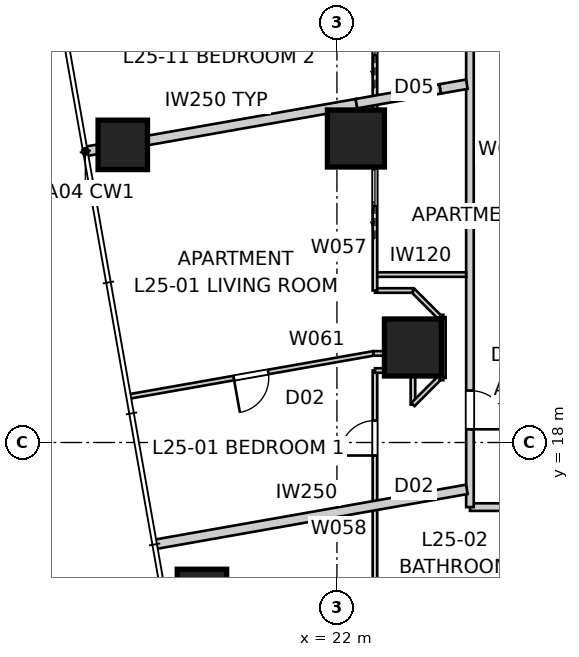
"""IFC4 building model, lengths in metres.
Left out: names, types, materials, properties, quantities, classifications, styles, units other than length and angle.
Written with IfcOpenShell. Run it as: python <this file> out.ifc"""

import sys

from ifc_helpers import new_model, si_unit, direction, frame, frame_2d, origin, origin_2d, place, context, subcontext, project, spatial, rectangle, extrude, element, fill, save


model = new_model("IFC4")
c1 = context("Model", 3, precision=1e-05, world=origin(), true_north=direction((0.0, 1.0)))
c2 = subcontext(c1, "Body", "Model", "MODEL_VIEW")
j1 = project(units=[si_unit("LENGTHUNIT", "METRE"), si_unit("PLANEANGLEUNIT", "RADIAN")], contexts=[c1])
p1 = place(None, origin())
s1 = spatial("IfcSite", under=j1, at=p1, CompositionType="ELEMENT")
p2 = place(p1, origin())
s2 = spatial("IfcBuilding", under=s1, at=p2, CompositionType="ELEMENT")
p3 = place(p2, frame((0.0, 0.0, 93.0)))
s3 = spatial("IfcBuildingStorey", under=s2, at=p3, CompositionType="ELEMENT", Elevation=93.0)
for number, where, z_axis, x_axis in (
    (1, (16.365, 25.833, 0.0), (0.0, 0.0, 1.0), (1.0, 0.0, 0.0)),
    (2, (18.448, 14.015, 0.0), (0.0, 0.0, 1.0), (1.0, 0.0, 0.0)),
):
    element("IfcColumn", number, at=place(p3, frame(where, z_axis=z_axis, x_axis=x_axis)), inside=s3, PredefinedType="COLUMN", context=c2, shape_type="SweptSolid", body=[
        extrude(rectangle(XDim=1.3, YDim=1.3, at=origin_2d()), origin(), (0.0, 0.0, 1.0), 3.4),
    ])
for number, where, z_axis, x_axis in (
    (3, (22.5, 26.0, 0.0), (0.0, 0.0, 1.0), (1.0, 0.0, 0.0)),
    (4, (24.0, 20.5, 0.0), (0.0, 0.0, 1.0), (1.0, 0.0, 0.0)),
):
    element("IfcColumn", number, at=place(p3, frame(where, z_axis=z_axis, x_axis=x_axis)), inside=s3, PredefinedType="COLUMN", context=c2, shape_type="SweptSolid", body=[
        extrude(rectangle(XDim=1.5, YDim=1.5, at=origin_2d()), origin(), (0.0, 0.0, 1.0), 3.4),
    ])
p4 = place(p3, frame((25.5, 16.3, 0.0), z_axis=(0.0, 0.0, 1.0), x_axis=(1.0, 0.0, 0.0)))
e5 = element("IfcWall", 5, at=p4, inside=s3, PredefinedType="PARTITIONING", context=c2, shape_type="SweptSolid", body=[
    extrude(rectangle(XDim=29.0, YDim=0.2, at=frame_2d((14.5, 0.0))), origin(), (0.0, 0.0, 1.0), 3.25),
])
p5 = place(p4, frame((20.896, 0.0, 0.0)))
e6 = element("IfcOpeningElement", 6, at=p5, cuts=e5, PredefinedType="OPENING", context=c2, shape_type="SweptSolid", body=[
    extrude(rectangle(XDim=1.02, YDim=2.34, at=frame_2d((0.51, 1.17))), frame((0.0, 0.11, 0.0), z_axis=(0.0, -1.0, 0.0), x_axis=(1.0, 0.0, 0.0)), (0.0, 0.0, 1.0), 0.22),
])
p6 = place(p4, frame((14.257, 0.0, 0.0)))
e7 = element("IfcOpeningElement", 7, at=p6, cuts=e5, PredefinedType="OPENING", context=c2, shape_type="SweptSolid", body=[
    extrude(rectangle(XDim=1.02, YDim=2.34, at=frame_2d((0.51, 1.17))), frame((0.0, 0.11, 0.0), z_axis=(0.0, -1.0, 0.0), x_axis=(1.0, 0.0, 0.0)), (0.0, 0.0, 1.0), 0.22),
])
p7 = place(p4, frame((3.857, 0.0, 0.0)))
e8 = element("IfcOpeningElement", 8, at=p7, cuts=e5, PredefinedType="OPENING", context=c2, shape_type="SweptSolid", body=[
    extrude(rectangle(XDim=1.02, YDim=2.34, at=frame_2d((0.51, 1.17))), frame((0.0, 0.11, 0.0), z_axis=(0.0, -1.0, 0.0), x_axis=(1.0, 0.0, 0.0)), (0.0, 0.0, 1.0), 0.22),
])
p8 = place(p3, frame((25.5, 43.7, 0.0), z_axis=(0.0, 0.0, 1.0), x_axis=(0.0, -1.0, 0.0)))
e9 = element("IfcWall", 9, at=p8, inside=s3, PredefinedType="PARTITIONING", context=c2, shape_type="SweptSolid", body=[
    extrude(rectangle(XDim=27.4, YDim=0.2, at=frame_2d((13.7, 0.0))), origin(), (0.0, 0.0, 1.0), 3.25),
])
p9 = place(p8, frame((24.333, 0.0, 0.0)))
e10 = element("IfcOpeningElement", 10, at=p9, cuts=e9, PredefinedType="OPENING", context=c2, shape_type="SweptSolid", body=[
    extrude(rectangle(XDim=1.02, YDim=2.1, at=frame_2d((0.51, 1.05))), frame((0.0, 0.11, 0.0), z_axis=(0.0, -1.0, 0.0), x_axis=(1.0, 0.0, 0.0)), (0.0, 0.0, 1.0), 0.22),
])
p10 = place(p8, frame((10.631, 0.0, 0.0)))
e11 = element("IfcOpeningElement", 11, at=p10, cuts=e9, PredefinedType="OPENING", context=c2, shape_type="SweptSolid", body=[
    extrude(rectangle(XDim=1.02, YDim=2.34, at=frame_2d((0.51, 1.17))), frame((0.0, 0.11, 0.0), z_axis=(0.0, -1.0, 0.0), x_axis=(1.0, 0.0, 0.0)), (0.0, 0.0, 1.0), 0.22),
])
p11 = place(p8, frame((0.911, 0.0, 0.0)))
e12 = element("IfcOpeningElement", 12, at=p11, cuts=e9, PredefinedType="OPENING", context=c2, shape_type="SweptSolid", body=[
    extrude(rectangle(XDim=1.02, YDim=2.34, at=frame_2d((0.51, 1.17))), frame((0.0, 0.11, 0.0), z_axis=(0.0, -1.0, 0.0), x_axis=(1.0, 0.0, 0.0)), (0.0, 0.0, 1.0), 0.22),
])
p12 = place(p3, frame((15.38, 25.659, 0.0), z_axis=(0.0, 0.0, 1.0), x_axis=(0.984802553948, 0.173677660443, 0.0)))
e13 = element("IfcWall", 13, at=p12, inside=s3, PredefinedType="PARTITIONING", context=c2, shape_type="SweptSolid", body=[
    extrude(rectangle(XDim=7.244, YDim=0.25, at=frame_2d((3.622, 0.0))), origin(), (0.0, 0.0, 1.0), 3.25),
])
p13 = place(p3, frame((22.513, 26.917, 0.0), z_axis=(0.0, 0.0, 1.0), x_axis=(0.984809882944, 0.17363609779, 0.0)))
e14 = element("IfcWall", 14, at=p13, inside=s3, PredefinedType="PARTITIONING", context=c2, shape_type="SweptSolid", body=[
    extrude(rectangle(XDim=2.24, YDim=0.25, at=frame_2d((1.12, 0.0))), origin(), (0.0, 0.0, 1.0), 2.795),
])
p14 = place(p3, frame((24.719, 27.306, 0.0), z_axis=(0.0, 0.0, 1.0), x_axis=(0.984835495461, 0.173490768861, 0.0)))
e15 = element("IfcWall", 15, at=p14, inside=s3, PredefinedType="PARTITIONING", context=c2, shape_type="SweptSolid", body=[
    extrude(rectangle(XDim=0.709, YDim=0.25, at=frame_2d((0.354, 0.0))), origin(), (0.0, 0.0, 1.0), 3.25),
])
p15 = place(p3, frame((17.203, 15.318, 0.0), z_axis=(0.0, 0.0, 1.0), x_axis=(0.984807121942, 0.173651756605, 0.0)))
e16 = element("IfcWall", 16, at=p15, inside=s3, PredefinedType="PARTITIONING", context=c2, shape_type="SweptSolid", body=[
    extrude(rectangle(XDim=8.341, YDim=0.25, at=frame_2d((4.171, 0.0))), origin(), (0.0, 0.0, 1.0), 3.25),
])
p16 = place(p3, frame((23.0, 22.419, 0.0), z_axis=(0.0, 0.0, 1.0), x_axis=(1.0, 0.0, 0.0)))
e17 = element("IfcWall", 17, at=p16, inside=s3, PredefinedType="PARTITIONING", context=c2, shape_type="SweptSolid", body=[
    extrude(rectangle(XDim=2.4, YDim=0.12, at=frame_2d((1.2, 0.0))), origin(), (0.0, 0.0, 1.0), 3.25),
])
p17 = place(p3, frame((24.0, 20.344, 0.0), z_axis=(0.0, 0.0, 1.0), x_axis=(0.0, -1.0, 0.0)))
e18 = element("IfcWall", 18, at=p17, inside=s3, PredefinedType="PARTITIONING", context=c2, shape_type="SweptSolid", body=[
    extrude(rectangle(XDim=1.344, YDim=0.12, at=frame_2d((0.672, 0.0))), origin(), (0.0, 0.0, 1.0), 3.25),
])
p18 = place(p3, frame((24.0, 19.0, 0.0), z_axis=(0.0, 0.0, 1.0), x_axis=(0.707106781187, 0.707106781187, 0.0)))
e19 = element("IfcWall", 19, at=p18, inside=s3, PredefinedType="PARTITIONING", context=c2, shape_type="SweptSolid", body=[
    extrude(rectangle(XDim=0.99, YDim=0.12, at=frame_2d((0.495, 0.0))), origin(), (0.0, 0.0, 1.0), 3.25),
])
p19 = place(p3, frame((24.8, 19.7, 0.0), z_axis=(0.0, 0.0, 1.0), x_axis=(0.0, 1.0, 0.0)))
e20 = element("IfcWall", 20, at=p19, inside=s3, PredefinedType="PARTITIONING", context=c2, shape_type="SweptSolid", body=[
    extrude(rectangle(XDim=1.6, YDim=0.12, at=frame_2d((0.8, 0.0))), origin(), (0.0, 0.0, 1.0), 3.25),
])
p20 = place(p3, frame((24.7, 21.3, 0.0), z_axis=(0.0, 0.0, 1.0), x_axis=(-0.707106781187, 0.707106781187, 0.0)))
e21 = element("IfcWall", 21, at=p20, inside=s3, PredefinedType="PARTITIONING", context=c2, shape_type="SweptSolid", body=[
    extrude(rectangle(XDim=0.99, YDim=0.12, at=frame_2d((0.495, 0.0))), origin(), (0.0, 0.0, 1.0), 3.25),
])
p21 = place(p3, frame((24.0, 22.0, 0.0), z_axis=(0.0, 0.0, 1.0), x_axis=(-1.0, 0.0, 0.0)))
e22 = element("IfcWall", 22, at=p21, inside=s3, PredefinedType="PARTITIONING", context=c2, shape_type="SweptSolid", body=[
    extrude(rectangle(XDim=1.0, YDim=0.12, at=frame_2d((0.5, 0.0))), origin(), (0.0, 0.0, 1.0), 2.722),
])
p22 = place(p3, frame((23.0, 22.0, 0.0), z_axis=(0.0, 0.0, 1.0), x_axis=(0.0, 1.0, 0.0)))
e23 = element("IfcWall", 23, at=p22, inside=s3, PredefinedType="PARTITIONING", context=c2, shape_type="SweptSolid", body=[
    extrude(rectangle(XDim=15.664, YDim=0.12, at=frame_2d((7.832, 0.0))), origin(), (0.0, 0.0, 1.0), 2.55),
])
p23 = place(p22, frame((9.874, 0.0, 0.0)))
e24 = element("IfcOpeningElement", 24, at=p23, cuts=e23, PredefinedType="OPENING", context=c2, shape_type="SweptSolid", body=[
    extrude(rectangle(XDim=0.92, YDim=2.34, at=frame_2d((0.46, 1.17))), frame((0.0, 0.07, 0.0), z_axis=(0.0, -1.0, 0.0), x_axis=(1.0, 0.0, 0.0)), (0.0, 0.0, 1.0), 0.14),
])
p24 = place(p22, frame((13.734, 0.0, 0.0)))
e25 = element("IfcOpeningElement", 25, at=p24, cuts=e23, PredefinedType="OPENING", context=c2, shape_type="SweptSolid", body=[
    extrude(rectangle(XDim=0.96, YDim=2.1, at=frame_2d((0.48, 1.05))), frame((0.0, 0.07, 0.0), z_axis=(0.0, -1.0, 0.0), x_axis=(1.0, 0.0, 0.0)), (0.0, 0.0, 1.0), 0.14),
])
p25 = place(p22, frame((6.198, 0.0, 0.0)))
e26 = element("IfcOpeningElement", 26, at=p25, cuts=e23, PredefinedType="OPENING", context=c2, shape_type="SweptSolid", body=[
    extrude(rectangle(XDim=0.96, YDim=2.1, at=frame_2d((0.48, 1.05))), frame((0.0, 0.07, 0.0), z_axis=(0.0, -1.0, 0.0), x_axis=(1.0, 0.0, 0.0)), (0.0, 0.0, 1.0), 0.14),
])
p26 = place(p22, frame((2.231, 0.0, 0.0)))
e27 = element("IfcOpeningElement", 27, at=p26, cuts=e23, PredefinedType="OPENING", context=c2, shape_type="SweptSolid", body=[
    extrude(rectangle(XDim=0.96, YDim=2.1, at=frame_2d((0.48, 1.05))), frame((0.0, 0.07, 0.0), z_axis=(0.0, -1.0, 0.0), x_axis=(1.0, 0.0, 0.0)), (0.0, 0.0, 1.0), 0.14),
])
p27 = place(p3, frame((23.0, 13.8, 0.0), z_axis=(0.0, 0.0, 1.0), x_axis=(0.0, 1.0, 0.0)))
e28 = element("IfcWall", 28, at=p27, inside=s3, PredefinedType="PARTITIONING", context=c2, shape_type="SweptSolid", body=[
    extrude(rectangle(XDim=6.094, YDim=0.12, at=frame_2d((3.047, 0.0))), origin(), (0.0, 0.0, 1.0), 3.25),
])
p28 = place(p27, frame((3.857, 0.0, 0.0)))
e29 = element("IfcOpeningElement", 29, at=p28, cuts=e28, PredefinedType="OPENING", context=c2, shape_type="SweptSolid", body=[
    extrude(rectangle(XDim=0.92, YDim=2.34, at=frame_2d((0.46, 1.17))), frame((0.0, 0.07, 0.0), z_axis=(0.0, -1.0, 0.0), x_axis=(1.0, 0.0, 0.0)), (0.0, 0.0, 1.0), 0.14),
])
p29 = place(p3, frame((23.0, 19.894, 0.0), z_axis=(0.0, 0.0, 1.0), x_axis=(1.0, 0.0, 0.0)))
e30 = element("IfcWall", 30, at=p29, inside=s3, PredefinedType="PARTITIONING", context=c2, shape_type="SweptSolid", body=[
    extrude(rectangle(XDim=1.0, YDim=0.12, at=frame_2d((0.5, 0.0))), origin(), (0.0, 0.0, 1.0), 3.25),
])
p30 = place(p3, frame((24.0, 20.344, 0.0), z_axis=(0.0, 0.0, 1.0), x_axis=(-1.0, 0.0, 0.0)))
e31 = element("IfcWall", 31, at=p30, inside=s3, PredefinedType="PARTITIONING", context=c2, shape_type="SweptSolid", body=[
    extrude(rectangle(XDim=1.039, YDim=0.12, at=frame_2d((0.52, 0.0))), origin(), (0.0, 0.0, 1.0), 3.25),
])
p31 = place(p3, frame((22.961, 20.344, 0.0), z_axis=(0.0, 0.0, 1.0), x_axis=(-0.984809249117, -0.173639692622, 0.0)))
e32 = element("IfcWall", 32, at=p31, inside=s3, PredefinedType="PARTITIONING", context=c2, shape_type="SweptSolid", body=[
    extrude(rectangle(XDim=6.503, YDim=0.12, at=frame_2d((3.251, 0.0))), origin(), (0.0, 0.0, 1.0), 3.25),
])
p32 = place(p31, frame((2.811, 0.0, 0.0)))
e33 = element("IfcOpeningElement", 33, at=p32, cuts=e32, PredefinedType="OPENING", context=c2, shape_type="SweptSolid", body=[
    extrude(rectangle(XDim=0.92, YDim=2.34, at=frame_2d((0.46, 1.17))), frame((0.0, 0.07, 0.0), z_axis=(0.0, -1.0, 0.0), x_axis=(1.0, 0.0, 0.0)), (0.0, 0.0, 1.0), 0.14),
])
for number, where, z_axis, x_axis in (
    (34, (24.8, 19.7, 0.0), (0.0, 0.0, 1.0), (-1.0, 0.0, 0.0)),
    (35, (24.8, 21.3, 0.0), (0.0, 0.0, 1.0), (-1.0, 0.0, 0.0)),
):
    element("IfcWall", number, at=place(p3, frame(where, z_axis=z_axis, x_axis=x_axis)), inside=s3, PredefinedType="PARTITIONING", context=c2, shape_type="SweptSolid", body=[
        extrude(rectangle(XDim=0.1, YDim=0.12, at=frame_2d((0.05, 0.0))), origin(), (0.0, 0.0, 1.0), 3.25),
    ])
p33 = place(p9, origin())
e36 = element("IfcDoor", 36, at=p33, inside=s3, OperationType="SINGLE_SWING_RIGHT", PredefinedType="DOOR", context=c2, shape_type="SweptSolid", body=[
    extrude(rectangle(XDim=1.02, YDim=2.1, at=frame_2d((0.51, 1.05))), frame((0.0, 0.025, 0.0), z_axis=(0.0, -1.0, 0.0), x_axis=(1.0, 0.0, 0.0)), (0.0, 0.0, 1.0), 0.05),
])
fill(e10, e36)
p34 = place(p28, origin())
e37 = element("IfcDoor", 37, at=p34, inside=s3, OperationType="SINGLE_SWING_LEFT", PredefinedType="DOOR", context=c2, shape_type="SweptSolid", body=[
    extrude(rectangle(XDim=0.92, YDim=2.34, at=frame_2d((0.46, 1.17))), frame((0.0, 0.025, 0.0), z_axis=(0.0, -1.0, 0.0), x_axis=(1.0, 0.0, 0.0)), (0.0, 0.0, 1.0), 0.05),
])
fill(e29, e37)
p35 = place(p25, origin())
e38 = element("IfcDoor", 38, at=p35, inside=s3, OperationType="SLIDING_TO_LEFT", PredefinedType="DOOR", context=c2, shape_type="SweptSolid", body=[
    extrude(rectangle(XDim=0.96, YDim=2.1, at=frame_2d((0.48, 1.05))), frame((0.0, 0.025, 0.0), z_axis=(0.0, -1.0, 0.0), x_axis=(1.0, 0.0, 0.0)), (0.0, 0.0, 1.0), 0.05),
])
fill(e26, e38)
p36 = place(p32, origin())
e39 = element("IfcDoor", 39, at=p36, inside=s3, OperationType="SINGLE_SWING_RIGHT", PredefinedType="DOOR", context=c2, shape_type="SweptSolid", body=[
    extrude(rectangle(XDim=0.92, YDim=2.34, at=frame_2d((0.46, 1.17))), frame((0.0, 0.025, 0.0), z_axis=(0.0, -1.0, 0.0), x_axis=(1.0, 0.0, 0.0)), (0.0, 0.0, 1.0), 0.05),
])
fill(e33, e39)
p37 = place(p26, origin())
e40 = element("IfcDoor", 40, at=p37, inside=s3, OperationType="SLIDING_TO_LEFT", PredefinedType="DOOR", context=c2, shape_type="SweptSolid", body=[
    extrude(rectangle(XDim=0.96, YDim=2.1, at=frame_2d((0.48, 1.05))), frame((0.0, 0.025, 0.0), z_axis=(0.0, -1.0, 0.0), x_axis=(1.0, 0.0, 0.0)), (0.0, 0.0, 1.0), 0.05),
])
fill(e27, e40)
save(model, sys.argv[1])
